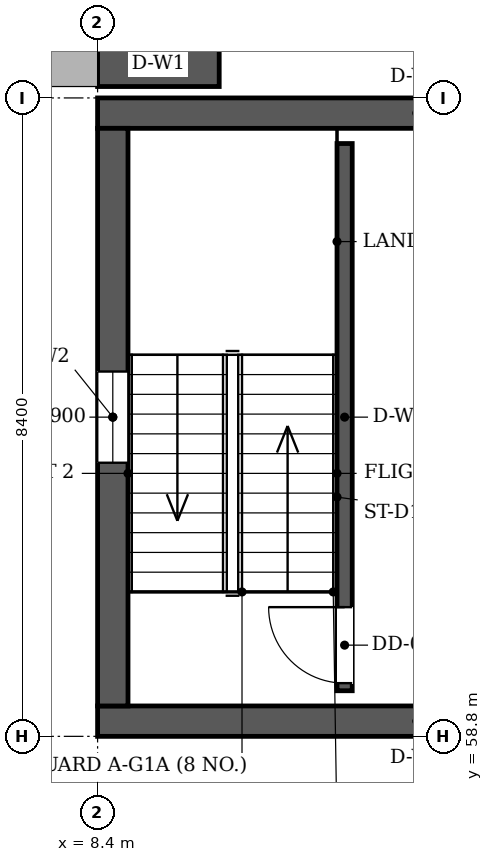
"""IFC4 building model, lengths in metres.
Left out: names, types, materials, properties, quantities, classifications, styles, units other than length and angle.
Written with IfcOpenShell. Run it as: python <this file> out.ifc"""

import sys

from ifc_helpers import new_model, si_unit, direction, frame, frame_2d, origin, place, context, subcontext, project, spatial, rectangle, extrude, element, fill, save


model = new_model("IFC4")
c1 = context("Model", 3, precision=1e-05, world=origin(), true_north=direction((0.0, 1.0)))
c2 = subcontext(c1, "Body", "Model", "MODEL_VIEW")
j1 = project(units=[si_unit("LENGTHUNIT", "METRE"), si_unit("PLANEANGLEUNIT", "RADIAN")], contexts=[c1])
p1 = place(None, origin())
s1 = spatial("IfcSite", under=j1, at=p1, CompositionType="ELEMENT")
p2 = place(p1, origin())
s2 = spatial("IfcBuilding", under=s1, at=p2, CompositionType="ELEMENT")
p3 = place(p2, origin())
s3 = spatial("IfcBuildingStorey", under=s2, at=p3, CompositionType="ELEMENT", Elevation=0.0)
p4 = place(p3, frame((8.4, 67.65, 0.0), z_axis=(0.0, 0.0, 1.0), x_axis=(1.0, 0.0, 0.0)))
e1 = element("IfcWall", 1, at=p4, inside=s3, PredefinedType="SOLIDWALL", context=c2, shape_type="SweptSolid", body=[
    extrude(rectangle(XDim=1.6, YDim=0.6, at=frame_2d((0.8, 0.0))), origin(), (0.0, 0.0, 1.0), 14.467),
])
p5 = place(p2, frame((0.0, 0.0, 6.0)))
s4 = spatial("IfcBuildingStorey", under=s2, at=p5, CompositionType="ELEMENT", Elevation=6.0)
for number, where, z_axis, x_axis in (
    (2, (8.4, 59.0, 0.0), (0.0, 0.0, 1.0), (1.0, 0.0, 0.0)),
    (3, (8.4, 67.0, 0.0), (0.0, 0.0, 1.0), (1.0, 0.0, 0.0)),
):
    element("IfcWall", number, at=place(p5, frame(where, z_axis=z_axis, x_axis=x_axis)), inside=s4, PredefinedType="SOLIDWALL", context=c2, shape_type="SweptSolid", body=[
        extrude(rectangle(XDim=8.4, YDim=0.4, at=frame_2d((4.2, 0.0))), origin(), (0.0, 0.0, 1.0), 3.92),
    ])
p6 = place(p5, frame((8.6, 59.2, 0.0), z_axis=(0.0, 0.0, 1.0), x_axis=(0.0, 1.0, 0.0)))
e4 = element("IfcWall", 4, at=p6, inside=s4, PredefinedType="SOLIDWALL", context=c2, shape_type="SweptSolid", body=[
    extrude(rectangle(XDim=7.6, YDim=0.4, at=frame_2d((3.8, 0.0))), origin(), (0.0, 0.0, 1.0), 3.92),
])
p7 = place(p6, frame((3.2, 0.0, 0.9)))
e5 = element("IfcOpeningElement", 5, at=p7, cuts=e4, PredefinedType="OPENING", context=c2, shape_type="SweptSolid", body=[
    extrude(rectangle(XDim=1.2, YDim=1.5, at=frame_2d((0.6, 0.75))), frame((0.0, 0.21, 0.0), z_axis=(0.0, -1.0, 0.0), x_axis=(1.0, 0.0, 0.0)), (0.0, 0.0, 1.0), 0.42),
])
p8 = place(p5, frame((11.65, 59.4, 0.0), z_axis=(0.0, 0.0, 1.0), x_axis=(0.0, 1.0, 0.0)))
e6 = element("IfcWall", 6, at=p8, inside=s4, PredefinedType="SOLIDWALL", context=c2, shape_type="SweptSolid", body=[
    extrude(rectangle(XDim=7.2, YDim=0.2, at=frame_2d((3.6, 0.0))), origin(), (0.0, 0.0, 1.0), 3.92),
])
p9 = place(p8, frame((0.1, 0.0, 0.0)))
e7 = element("IfcOpeningElement", 7, at=p9, cuts=e6, PredefinedType="OPENING", context=c2, shape_type="SweptSolid", body=[
    extrude(rectangle(XDim=1.0, YDim=2.1, at=frame_2d((0.5, 1.05))), frame((0.0, 0.11, 0.0), z_axis=(0.0, -1.0, 0.0), x_axis=(1.0, 0.0, 0.0)), (0.0, 0.0, 1.0), 0.22),
])
p10 = place(p7, origin())
e8 = element("IfcWindow", 8, at=p10, inside=s4, PartitioningType="SINGLE_PANEL", PredefinedType="WINDOW", context=c2, shape_type="SweptSolid", body=[
    extrude(rectangle(XDim=1.2, YDim=1.5, at=frame_2d((0.6, 0.75))), frame((0.0, 0.03, 0.0), z_axis=(0.0, -1.0, 0.0), x_axis=(1.0, 0.0, 0.0)), (0.0, 0.0, 1.0), 0.06),
])
fill(e5, e8)
p11 = place(p9, origin())
e9 = element("IfcDoor", 9, at=p11, inside=s4, OperationType="SINGLE_SWING_LEFT", PredefinedType="DOOR", context=c2, shape_type="SweptSolid", body=[
    extrude(rectangle(XDim=1.0, YDim=2.1, at=frame_2d((0.5, 1.05))), frame((0.0, 0.025, 0.0), z_axis=(0.0, -1.0, 0.0), x_axis=(1.0, 0.0, 0.0)), (0.0, 0.0, 1.0), 0.05),
])
fill(e7, e9)
save(model, sys.argv[1])
